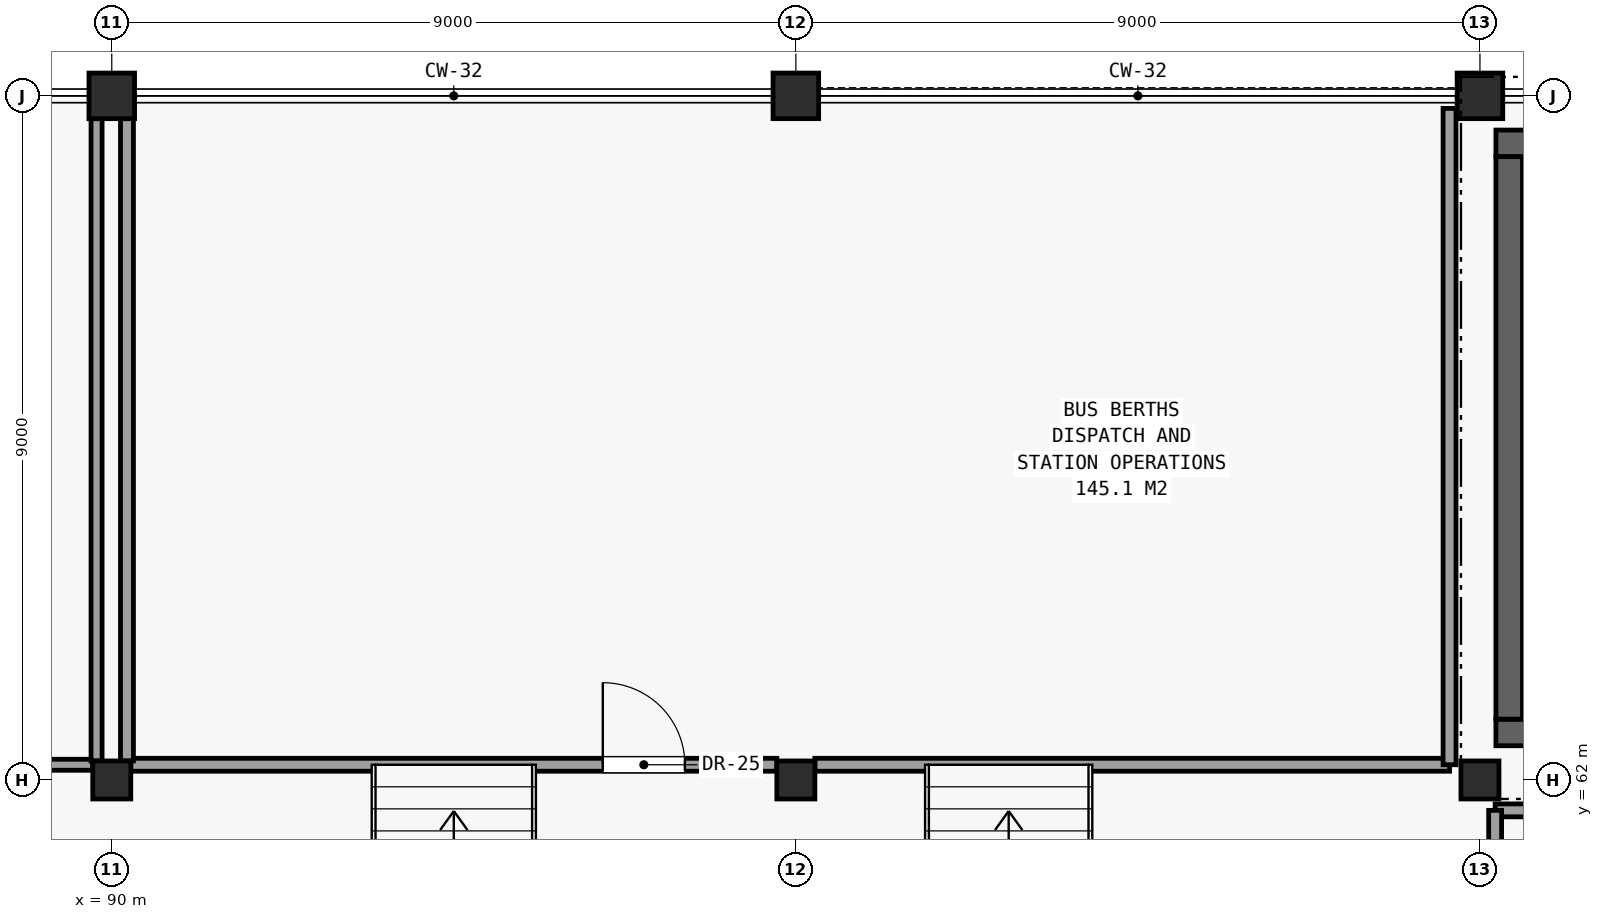
"""IFC4 building model, lengths in metres.
Left out: names, types, materials, properties, quantities, classifications, styles, units other than length and angle.
Written with IfcOpenShell. Run it as: python <this file> out.ifc"""

import sys

from ifc_helpers import new_model, si_unit, direction, frame, frame_2d, origin, origin_2d, place, context, subcontext, project, spatial, rectangle, hollow_rectangle, extrude, element, fill, save


model = new_model("IFC4")
c1 = context("Model", 3, precision=1e-05, world=origin(), true_north=direction((0.0, 1.0)))
c2 = subcontext(c1, "Body", "Model", "MODEL_VIEW")
j1 = project(units=[si_unit("LENGTHUNIT", "METRE"), si_unit("PLANEANGLEUNIT", "RADIAN")], contexts=[c1])
p1 = place(None, origin())
s1 = spatial("IfcSite", under=j1, at=p1, CompositionType="ELEMENT")
p2 = place(p1, origin())
s2 = spatial("IfcBuilding", under=s1, at=p2, CompositionType="ELEMENT")
p3 = place(p2, origin())
s3 = spatial("IfcBuildingStorey", under=s2, at=p3, CompositionType="ELEMENT", Elevation=0.0)
p4 = place(p3, frame((90.0, 62.0, 0.0), z_axis=(0.0, 0.0, 1.0), x_axis=(1.0, 0.0, 0.0)))
e1 = element("IfcColumn", 1, at=p4, inside=s3, PredefinedType="COLUMN", context=c2, shape_type="SweptSolid", body=[
    extrude(hollow_rectangle(XDim=0.5, YDim=0.5, WallThickness=0.025, at=origin_2d()), origin(), (0.0, 0.0, 1.0), 5.04),
])
p5 = place(p3, frame((90.0, 71.0, 0.0), z_axis=(0.0, 0.0, 1.0), x_axis=(1.0, 0.0, 0.0)))
e2 = element("IfcColumn", 2, at=p5, inside=s3, PredefinedType="COLUMN", context=c2, shape_type="SweptSolid", body=[
    extrude(hollow_rectangle(XDim=0.6, YDim=0.6, WallThickness=0.032, at=origin_2d()), origin(), (0.0, 0.0, 1.0), 5.1),
])
p6 = place(p3, frame((99.0, 62.0, 0.0), z_axis=(0.0, 0.0, 1.0), x_axis=(1.0, 0.0, 0.0)))
e3 = element("IfcColumn", 3, at=p6, inside=s3, PredefinedType="COLUMN", context=c2, shape_type="SweptSolid", body=[
    extrude(hollow_rectangle(XDim=0.5, YDim=0.5, WallThickness=0.025, at=origin_2d()), origin(), (0.0, 0.0, 1.0), 5.04),
])
p7 = place(p3, frame((99.0, 71.0, 0.0), z_axis=(0.0, 0.0, 1.0), x_axis=(1.0, 0.0, 0.0)))
e4 = element("IfcColumn", 4, at=p7, inside=s3, PredefinedType="COLUMN", context=c2, shape_type="SweptSolid", body=[
    extrude(hollow_rectangle(XDim=0.6, YDim=0.6, WallThickness=0.032, at=origin_2d()), origin(), (0.0, 0.0, 1.0), 5.1),
])
p8 = place(p3, frame((108.0, 62.0, 0.0), z_axis=(0.0, 0.0, 1.0), x_axis=(1.0, 0.0, 0.0)))
e5 = element("IfcColumn", 5, at=p8, inside=s3, PredefinedType="COLUMN", context=c2, shape_type="SweptSolid", body=[
    extrude(hollow_rectangle(XDim=0.5, YDim=0.5, WallThickness=0.025, at=origin_2d()), origin(), (0.0, 0.0, 1.0), 5.1),
])
p9 = place(p3, frame((108.0, 71.0, 0.0), z_axis=(0.0, 0.0, 1.0), x_axis=(1.0, 0.0, 0.0)))
e6 = element("IfcColumn", 6, at=p9, inside=s3, PredefinedType="COLUMN", context=c2, shape_type="SweptSolid", body=[
    extrude(hollow_rectangle(XDim=0.6, YDim=0.6, WallThickness=0.032, at=origin_2d()), origin(), (0.0, 0.0, 1.0), 5.1),
])
for number, where, z_axis, x_axis in (
    (7, (108.21, 62.625, 0.0), (0.0, 0.0, 1.0), (1.0, 0.0, 0.0)),
    (8, (108.21, 70.375, 0.0), (0.0, 0.0, 1.0), (1.0, 0.0, 0.0)),
):
    element("IfcWall", number, at=place(p3, frame(where, z_axis=z_axis, x_axis=x_axis)), inside=s3, PredefinedType="SHEAR", context=c2, shape_type="SweptSolid", body=[
        extrude(rectangle(XDim=3.98, YDim=0.35, at=frame_2d((1.99, 0.0))), origin(), (0.0, 0.0, 1.0), 4.85),
    ])
p10 = place(p3, frame((108.385, 62.8, 0.0), z_axis=(0.0, 0.0, 1.0), x_axis=(0.0, 1.0, 0.0)))
e9 = element("IfcWall", 9, at=p10, inside=s3, PredefinedType="SHEAR", context=c2, shape_type="SweptSolid", body=[
    extrude(rectangle(XDim=7.4, YDim=0.35, at=frame_2d((3.7, 0.0))), origin(), (0.0, 0.0, 1.0), 4.85),
])
p11 = place(p3, frame((108.2, 61.6, 0.0), z_axis=(0.0, 0.0, 1.0), x_axis=(1.0, 0.0, 0.0)))
e10 = element("IfcWall", 10, at=p11, inside=s3, PredefinedType="PARTITIONING", context=c2, shape_type="SweptSolid", body=[
    extrude(rectangle(XDim=8.635, YDim=0.17, at=frame_2d((4.317, 0.0))), origin(), (0.0, 0.0, 1.0), 4.84),
])
p12 = place(p3, frame((108.2, 36.3, 0.0), z_axis=(0.0, 0.0, 1.0), x_axis=(0.0, 1.0, 0.0)))
e11 = element("IfcWall", 11, at=p12, inside=s3, PredefinedType="PARTITIONING", context=c2, shape_type="SweptSolid", body=[
    extrude(rectangle(XDim=25.3, YDim=0.17, at=frame_2d((12.65, 0.0))), origin(), (0.0, 0.0, 1.0), 4.84),
])
p13 = place(p12, frame((12.72, 0.0, 0.0)))
e12 = element("IfcOpeningElement", 12, at=p13, cuts=e11, PredefinedType="OPENING", context=c2, shape_type="SweptSolid", body=[
    extrude(rectangle(XDim=0.96, YDim=2.2, at=frame_2d((0.48, 1.1))), frame((0.0, 0.096, 0.0), z_axis=(0.0, -1.0, 0.0), x_axis=(1.0, 0.0, 0.0)), (0.0, 0.0, 1.0), 0.192),
])
p14 = place(p3, frame((81.25, 62.2, 0.0), z_axis=(0.0, 0.0, 1.0), x_axis=(1.0, 0.0, 0.0)))
e13 = element("IfcWall", 13, at=p14, inside=s3, PredefinedType="PARTITIONING", context=c2, shape_type="SweptSolid", body=[
    extrude(rectangle(XDim=8.5, YDim=0.145, at=frame_2d((4.25, 0.0))), origin(), (0.0, 0.0, 1.0), 4.2),
])
p15 = place(p3, frame((89.8, 62.25, 0.0), z_axis=(0.0, 0.0, 1.0), x_axis=(0.0, 1.0, 0.0)))
e14 = element("IfcWall", 14, at=p15, inside=s3, PredefinedType="PARTITIONING", context=c2, shape_type="SweptSolid", body=[
    extrude(rectangle(XDim=8.45, YDim=0.145, at=frame_2d((4.225, 0.0))), origin(), (0.0, 0.0, 1.0), 4.2),
])
p16 = place(p3, frame((90.25, 62.2, 0.0), z_axis=(0.0, 0.0, 1.0), x_axis=(1.0, 0.0, 0.0)))
e15 = element("IfcWall", 15, at=p16, inside=s3, PredefinedType="PARTITIONING", context=c2, shape_type="SweptSolid", body=[
    extrude(rectangle(XDim=8.5, YDim=0.17, at=frame_2d((4.25, 0.0))), origin(), (0.0, 0.0, 1.0), 4.2),
])
p17 = place(p16, frame((6.21, 0.0, 0.0)))
e16 = element("IfcOpeningElement", 16, at=p17, cuts=e15, PredefinedType="OPENING", context=c2, shape_type="SweptSolid", body=[
    extrude(rectangle(XDim=1.08, YDim=2.15, at=frame_2d((0.54, 1.075))), frame((0.0, 0.096, 0.0), z_axis=(0.0, -1.0, 0.0), x_axis=(1.0, 0.0, 0.0)), (0.0, 0.0, 1.0), 0.192),
])
p18 = place(p3, frame((99.25, 62.2, 0.0), z_axis=(0.0, 0.0, 1.0), x_axis=(1.0, 0.0, 0.0)))
e17 = element("IfcWall", 17, at=p18, inside=s3, PredefinedType="PARTITIONING", context=c2, shape_type="SweptSolid", body=[
    extrude(rectangle(XDim=8.35, YDim=0.17, at=frame_2d((4.175, 0.0))), origin(), (0.0, 0.0, 1.0), 4.15),
])
p19 = place(p3, frame((90.2, 62.25, 0.0), z_axis=(0.0, 0.0, 1.0), x_axis=(0.0, 1.0, 0.0)))
e18 = element("IfcWall", 18, at=p19, inside=s3, PredefinedType="PARTITIONING", context=c2, shape_type="SweptSolid", body=[
    extrude(rectangle(XDim=8.45, YDim=0.17, at=frame_2d((4.225, 0.0))), origin(), (0.0, 0.0, 1.0), 4.2),
])
p20 = place(p3, frame((107.6, 62.2, 0.0), z_axis=(0.0, 0.0, 1.0), x_axis=(0.0, 1.0, 0.0)))
e19 = element("IfcWall", 19, at=p20, inside=s3, PredefinedType="PARTITIONING", context=c2, shape_type="SweptSolid", body=[
    extrude(rectangle(XDim=8.635, YDim=0.17, at=frame_2d((4.317, 0.0))), origin(), (0.0, 0.0, 1.0), 4.15),
])
p21 = place(p17, origin())
e20 = element("IfcDoor", 20, at=p21, inside=s3, OperationType="SINGLE_SWING_LEFT", PredefinedType="DOOR", context=c2, shape_type="SweptSolid", body=[
    extrude(rectangle(XDim=1.08, YDim=2.15, at=frame_2d((0.54, 1.075))), frame((0.0, 0.025, 0.0), z_axis=(0.0, -1.0, 0.0), x_axis=(1.0, 0.0, 0.0)), (0.0, 0.0, 1.0), 0.05),
])
fill(e16, e20)
save(model, sys.argv[1])
